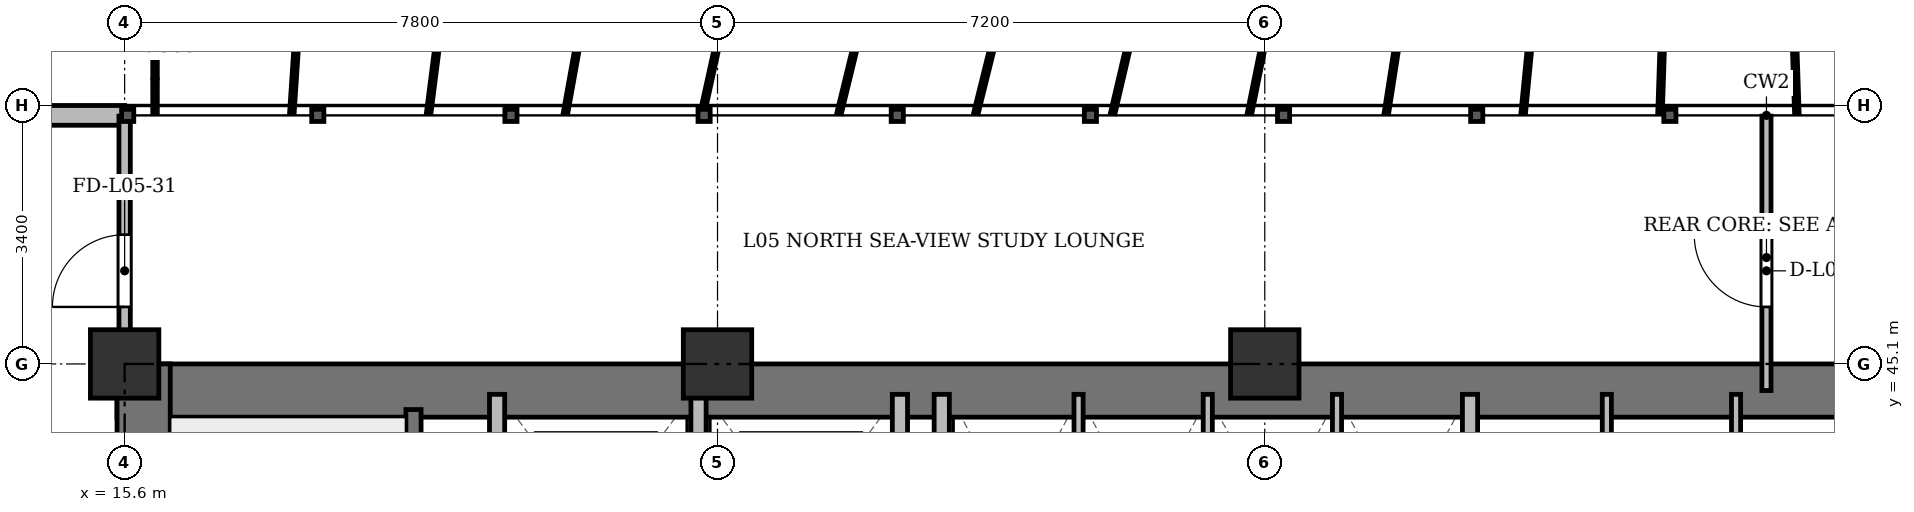
"""IFC4 building model, lengths in metres.
Left out: names, types, materials, properties, quantities, classifications, styles, units other than length and angle.
Written with IfcOpenShell. Run it as: python <this file> out.ifc"""

import sys

from ifc_helpers import new_model, si_unit, direction, frame, frame_2d, origin, origin_2d, place, context, subcontext, project, spatial, rectangle, extrude, source, transform, mapped, element, fill, save


model = new_model("IFC4")
c1 = context("Model", 3, precision=1e-05, world=origin(), true_north=direction((0.0, 1.0)))
c2 = subcontext(c1, "Body", "Model", "MODEL_VIEW")
j1 = project(units=[si_unit("LENGTHUNIT", "METRE"), si_unit("PLANEANGLEUNIT", "RADIAN")], contexts=[c1])
p1 = place(None, origin())
s1 = spatial("IfcSite", under=j1, at=p1, CompositionType="ELEMENT")
p2 = place(p1, origin())
s2 = spatial("IfcBuilding", under=s1, at=p2, CompositionType="ELEMENT")
p3 = place(p2, frame((0.0, 0.0, 23.5)))
s3 = spatial("IfcBuildingStorey", under=s2, at=p3, CompositionType="ELEMENT", Elevation=23.5)
m1 = source(origin(), c2, "Body", "SweptSolid", [
    extrude(rectangle(XDim=0.9, YDim=0.9, at=origin_2d()), origin(), (0.0, 0.0, 1.0), 3.6),
])
for number, where, z_axis, x_axis in (
    (1, (15.6, 45.1, 0.0), (0.0, 0.0, 1.0), (1.0, 0.0, 0.0)),
    (2, (23.4, 45.1, 0.0), (0.0, 0.0, 1.0), (1.0, 0.0, 0.0)),
    (3, (30.6, 45.1, 0.0), (0.0, 0.0, 1.0), (1.0, 0.0, 0.0)),
):
    element("IfcColumn", number, at=place(p3, frame(where, z_axis=z_axis, x_axis=x_axis)), inside=s3, PredefinedType="COLUMN", context=c2, shape_type="MappedRepresentation", body=[
        mapped(m1, transform((0.0, 0.0, 0.0), x_axis=(1.0, 0.0, 0.0), y_axis=(0.0, 1.0, 0.0), z_axis=(0.0, 0.0, 1.0), scale=1.0)),
    ])
p4 = place(p3, frame((7.6, 48.37, 0.0), z_axis=(0.0, 0.0, 1.0), x_axis=(1.0, 0.0, 0.0)))
e4 = element("IfcWall", 4, at=p4, inside=s3, PredefinedType="SOLIDWALL", context=c2, shape_type="SweptSolid", body=[
    extrude(rectangle(XDim=8.0, YDim=0.26, at=frame_2d((4.0, 0.0))), origin(), (0.0, 0.0, 1.0), 3.34),
])
p5 = place(p4, frame((0.768, 0.0, 0.9)))
e5 = element("IfcOpeningElement", 5, at=p5, cuts=e4, PredefinedType="OPENING", context=c2, shape_type="SweptSolid", body=[
    extrude(rectangle(XDim=1.2, YDim=1.65, at=frame_2d((0.6, 0.825))), frame((0.0, 0.14, 0.0), z_axis=(0.0, -1.0, 0.0), x_axis=(1.0, 0.0, 0.0)), (0.0, 0.0, 1.0), 0.28),
])
p6 = place(p4, frame((4.441, 0.0, 0.9)))
e6 = element("IfcOpeningElement", 6, at=p6, cuts=e4, PredefinedType="OPENING", context=c2, shape_type="SweptSolid", body=[
    extrude(rectangle(XDim=1.35, YDim=1.5, at=frame_2d((0.675, 0.75))), frame((0.0, 0.14, 0.0), z_axis=(0.0, -1.0, 0.0), x_axis=(1.0, 0.0, 0.0)), (0.0, 0.0, 1.0), 0.28),
])
p7 = place(p3, frame((15.5, 44.75, 0.0), z_axis=(0.0, 0.0, 1.0), x_axis=(1.0, 0.0, 0.0)))
e7 = element("IfcWall", 7, at=p7, inside=s3, PredefinedType="SHEAR", context=c2, shape_type="SweptSolid", body=[
    extrude(rectangle(XDim=43.4, YDim=0.7, at=frame_2d((21.7, 0.0))), origin(), (0.0, 0.0, 1.0), 3.34),
])
p8 = place(p3, frame((15.85, 33.4, 0.0), z_axis=(0.0, 0.0, 1.0), x_axis=(0.0, 1.0, 0.0)))
e8 = element("IfcWall", 8, at=p8, inside=s3, PredefinedType="SHEAR", context=c2, shape_type="SweptSolid", body=[
    extrude(rectangle(XDim=11.7, YDim=0.7, at=frame_2d((5.85, 0.0))), origin(), (0.0, 0.0, 1.0), 3.34),
])
p9 = place(p3, frame((19.4, 33.4, 0.0), z_axis=(0.0, 0.0, 1.0), x_axis=(0.0, 1.0, 0.0)))
e9 = element("IfcWall", 9, at=p9, inside=s3, PredefinedType="SHEAR", context=c2, shape_type="SweptSolid", body=[
    extrude(rectangle(XDim=11.1, YDim=0.2, at=frame_2d((5.55, 0.0))), origin(), (0.0, 0.0, 1.0), 3.34),
])
p10 = place(p9, frame((0.85, 0.0, 0.0)))
e10 = element("IfcOpeningElement", 10, at=p10, cuts=e9, PredefinedType="OPENING", context=c2, shape_type="SweptSolid", body=[
    extrude(rectangle(XDim=1.1, YDim=2.15, at=frame_2d((0.55, 1.075))), frame((0.0, 0.11, 0.0), z_axis=(0.0, -1.0, 0.0), x_axis=(1.0, 0.0, 0.0)), (0.0, 0.0, 1.0), 0.22),
])
for number, where, z_axis, x_axis in (
    (11, (20.5, 41.3, 0.0), (0.0, 0.0, 1.0), (0.0, 1.0, 0.0)),
    (12, (23.15, 41.3, 0.0), (0.0, 0.0, 1.0), (0.0, 1.0, 0.0)),
    (13, (25.8, 41.3, 0.0), (0.0, 0.0, 1.0), (0.0, 1.0, 0.0)),
):
    element("IfcWall", number, at=place(p3, frame(where, z_axis=z_axis, x_axis=x_axis)), inside=s3, PredefinedType="SOLIDWALL", context=c2, shape_type="SweptSolid", body=[
        extrude(rectangle(XDim=3.4, YDim=0.2, at=frame_2d((1.7, 0.0))), origin(), (0.0, 0.0, 1.0), 3.34),
    ])
p11 = place(p3, frame((26.35, 33.4, 0.0), z_axis=(0.0, 0.0, 1.0), x_axis=(0.0, 1.0, 0.0)))
e14 = element("IfcWall", 14, at=p11, inside=s3, PredefinedType="SOLIDWALL", context=c2, shape_type="SweptSolid", body=[
    extrude(rectangle(XDim=11.3, YDim=0.2, at=frame_2d((5.65, 0.0))), origin(), (0.0, 0.0, 1.0), 2.69),
])
p12 = place(p3, frame((33.3, 41.5, 0.0), z_axis=(0.0, 0.0, 1.0), x_axis=(0.0, 1.0, 0.0)))
e15 = element("IfcWall", 15, at=p12, inside=s3, PredefinedType="SOLIDWALL", context=c2, shape_type="SweptSolid", body=[
    extrude(rectangle(XDim=3.2, YDim=0.2, at=frame_2d((1.6, 0.0))), origin(), (0.0, 0.0, 1.0), 3.34),
])
for number, where, z_axis, x_axis in (
    (16, (28.15, 41.5, 0.0), (0.0, 0.0, 1.0), (0.0, 1.0, 0.0)),
    (17, (29.85, 41.5, 0.0), (0.0, 0.0, 1.0), (0.0, 1.0, 0.0)),
    (18, (31.55, 41.5, 0.0), (0.0, 0.0, 1.0), (0.0, 1.0, 0.0)),
    (19, (35.1, 41.5, 0.0), (0.0, 0.0, 1.0), (0.0, 1.0, 0.0)),
    (20, (36.8, 41.5, 0.0), (0.0, 0.0, 1.0), (0.0, 1.0, 0.0)),
):
    element("IfcWall", number, at=place(p3, frame(where, z_axis=z_axis, x_axis=x_axis)), inside=s3, PredefinedType="PARTITIONING", context=c2, shape_type="SweptSolid", body=[
        extrude(rectangle(XDim=3.2, YDim=0.12, at=frame_2d((1.6, 0.0))), origin(), (0.0, 0.0, 1.0), 3.34),
    ])
p13 = place(p3, frame((37.2, 44.75, 0.0), z_axis=(0.0, 0.0, 1.0), x_axis=(0.0, 1.0, 0.0)))
e21 = element("IfcWall", 21, at=p13, inside=s3, PredefinedType="PARTITIONING", context=c2, shape_type="SweptSolid", body=[
    extrude(rectangle(XDim=3.61, YDim=0.12, at=frame_2d((1.805, 0.0))), origin(), (0.0, 0.0, 1.0), 2.69),
])
p14 = place(p13, frame((1.1, 0.0, 0.0)))
e22 = element("IfcOpeningElement", 22, at=p14, cuts=e21, PredefinedType="OPENING", context=c2, shape_type="SweptSolid", body=[
    extrude(rectangle(XDim=0.95, YDim=2.15, at=frame_2d((0.475, 1.075))), frame((0.0, 0.07, 0.0), z_axis=(0.0, -1.0, 0.0), x_axis=(1.0, 0.0, 0.0)), (0.0, 0.0, 1.0), 0.14),
])
p15 = place(p3, frame((15.6, 44.75, 0.0), z_axis=(0.0, 0.0, 1.0), x_axis=(0.0, 1.0, 0.0)))
e23 = element("IfcWall", 23, at=p15, inside=s3, PredefinedType="PARTITIONING", context=c2, shape_type="SweptSolid", body=[
    extrude(rectangle(XDim=3.61, YDim=0.15, at=frame_2d((1.805, 0.0))), origin(), (0.0, 0.0, 1.0), 2.752),
])
p16 = place(p15, frame((1.1, 0.0, 0.0)))
e24 = element("IfcOpeningElement", 24, at=p16, cuts=e23, PredefinedType="OPENING", context=c2, shape_type="SweptSolid", body=[
    extrude(rectangle(XDim=0.95, YDim=2.15, at=frame_2d((0.475, 1.075))), frame((0.0, 0.085, 0.0), z_axis=(0.0, -1.0, 0.0), x_axis=(1.0, 0.0, 0.0)), (0.0, 0.0, 1.0), 0.17),
])
m2 = source(origin(), c2, "Body", "SweptSolid", [
    extrude(rectangle(XDim=0.95, YDim=2.15, at=frame_2d((0.475, 1.075))), frame((0.0, 0.025, 0.0), z_axis=(0.0, -1.0, 0.0), x_axis=(1.0, 0.0, 0.0)), (0.0, 0.0, 1.0), 0.05),
])
p17 = place(p14, origin())
e25 = element("IfcDoor", 25, at=p17, inside=s3, OperationType="SINGLE_SWING_RIGHT", PredefinedType="DOOR", context=c2, shape_type="MappedRepresentation", body=[
    mapped(m2, transform((0.0, 0.0, 0.0), x_axis=(1.0, 0.0, 0.0), y_axis=(0.0, 1.0, 0.0), z_axis=(0.0, 0.0, 1.0), scale=1.0)),
])
fill(e22, e25)
p18 = place(p16, origin())
e26 = element("IfcDoor", 26, at=p18, inside=s3, OperationType="SINGLE_SWING_LEFT", PredefinedType="DOOR", context=c2, shape_type="MappedRepresentation", body=[
    mapped(m2, transform((0.0, 0.0, 0.0), x_axis=(1.0, 0.0, 0.0), y_axis=(0.0, 1.0, 0.0), z_axis=(0.0, 0.0, 1.0), scale=1.0)),
])
fill(e24, e26)
save(model, sys.argv[1])
